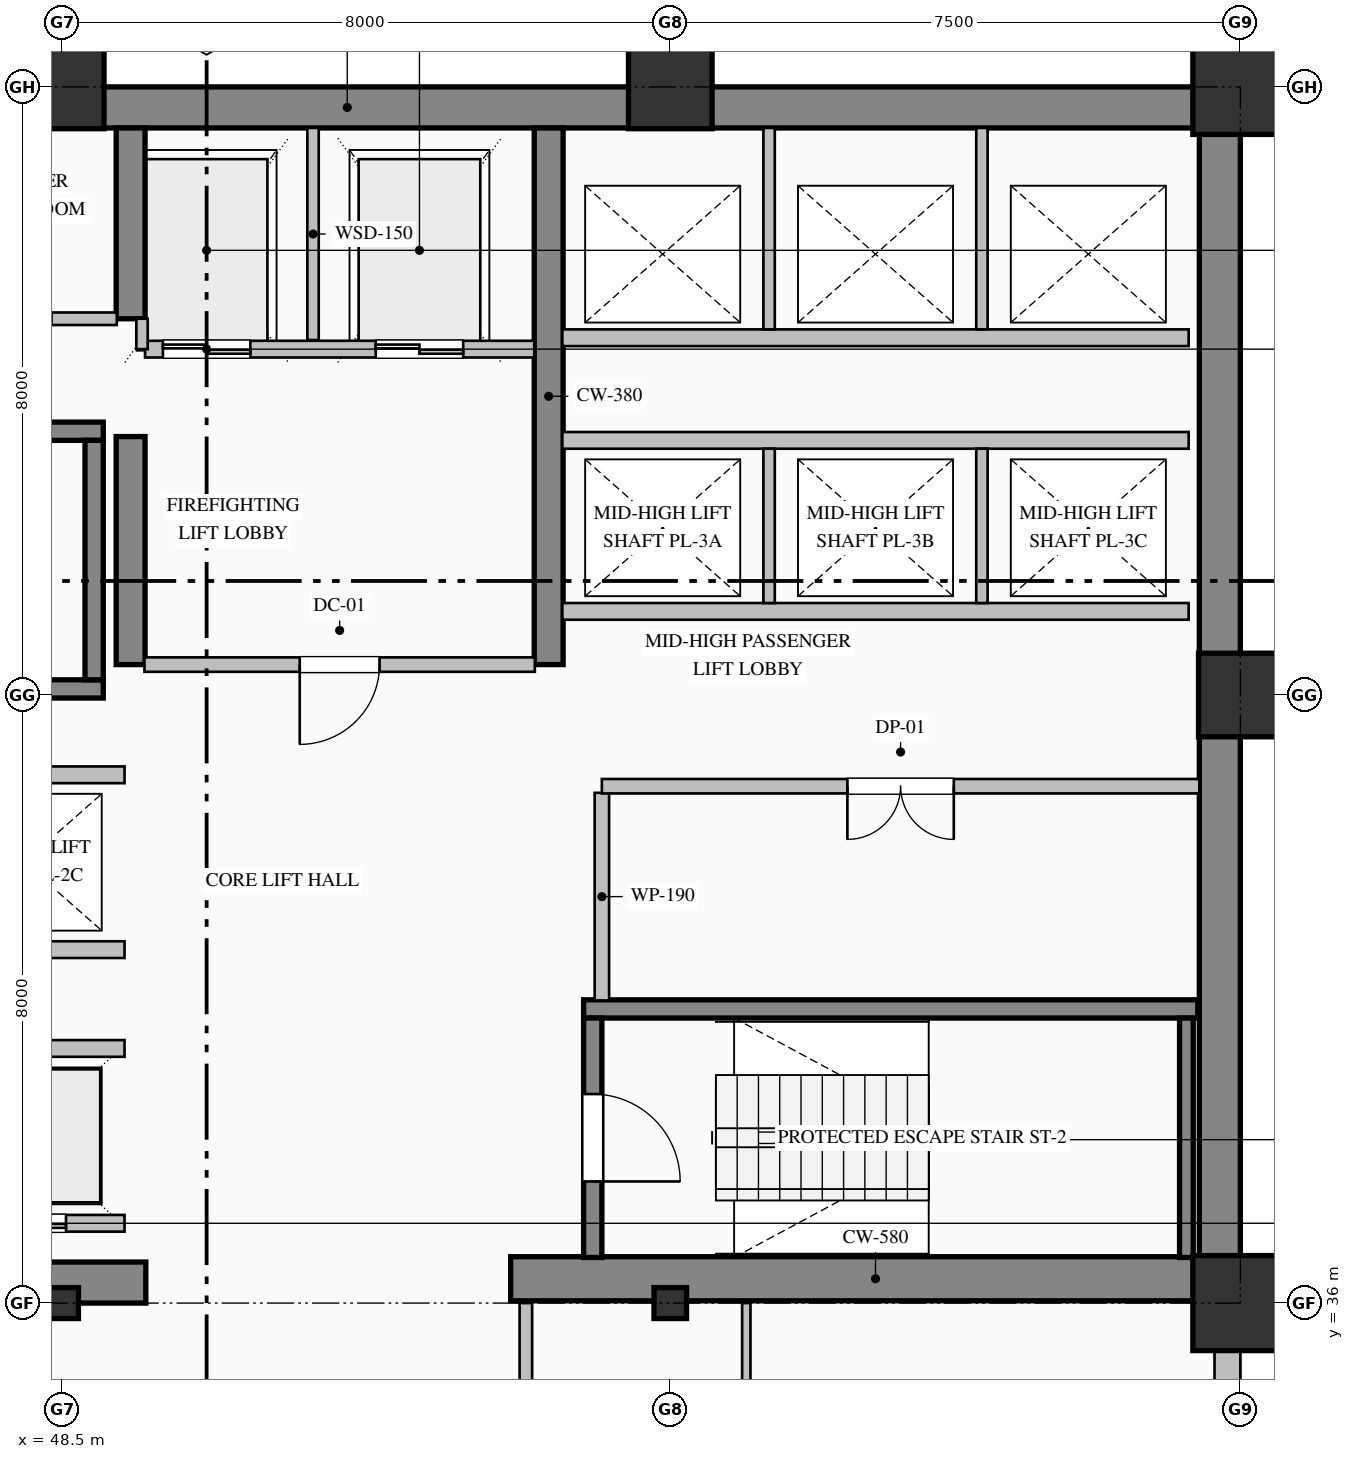
"""IFC4 building model, lengths in metres.
Left out: names, types, materials, properties, quantities, classifications, styles, units other than length and angle.
Written with IfcOpenShell. Run it as: python <this file> out.ifc"""

import sys

from ifc_helpers import new_model, si_unit, direction, frame, frame_2d, origin, origin_2d, place, context, subcontext, project, spatial, rectangle, hollow_rectangle, i_section, extrude, element, fill, save


model = new_model("IFC4")
c1 = context("Model", 3, precision=1e-05, world=origin(), true_north=direction((0.0, 1.0)))
c2 = subcontext(c1, "Body", "Model", "MODEL_VIEW")
j1 = project(units=[si_unit("LENGTHUNIT", "METRE"), si_unit("PLANEANGLEUNIT", "RADIAN")], contexts=[c1])
p1 = place(None, origin())
s1 = spatial("IfcSite", under=j1, at=p1, CompositionType="ELEMENT")
p2 = place(p1, origin())
s2 = spatial("IfcBuilding", under=s1, at=p2, CompositionType="ELEMENT")
p3 = place(p2, frame((0.0, 0.0, 72.2)))
s3 = spatial("IfcBuildingStorey", under=s2, at=p3, CompositionType="ELEMENT", Elevation=72.2)
p4 = place(p3, frame((40.5, 51.73, 0.0), z_axis=(0.0, 0.0, 1.0), x_axis=(1.0, 0.0, 0.0)))
e1 = element("IfcWall", 1, at=p4, inside=s3, PredefinedType="SHEAR", context=c2, shape_type="SweptSolid", body=[
    extrude(rectangle(XDim=23.5, YDim=0.54, at=frame_2d((11.75, 0.0))), origin(), (0.0, 0.0, 1.0), 3.75),
])
p5 = place(p3, frame((63.73, 36.32, 0.0), z_axis=(0.0, 0.0, 1.0), x_axis=(0.0, 1.0, 0.0)))
e2 = element("IfcWall", 2, at=p5, inside=s3, PredefinedType="SHEAR", context=c2, shape_type="SweptSolid", body=[
    extrude(rectangle(XDim=15.14, YDim=0.54, at=frame_2d((7.57, 0.0))), origin(), (0.0, 0.0, 1.0), 3.75),
])
p6 = place(p3, frame((48.2, 36.27, 0.0), z_axis=(0.0, 0.0, 1.0), x_axis=(1.0, 0.0, 0.0)))
e3 = element("IfcWall", 3, at=p6, inside=s3, PredefinedType="SHEAR", context=c2, shape_type="SweptSolid", body=[
    extrude(rectangle(XDim=1.4, YDim=0.54, at=frame_2d((0.7, 0.0))), origin(), (0.0, 0.0, 1.0), 3.75),
])
p7 = place(p3, frame((54.4, 36.32, 0.0), z_axis=(0.0, 0.0, 1.0), x_axis=(1.0, 0.0, 0.0)))
e4 = element("IfcWall", 4, at=p7, inside=s3, PredefinedType="SHEAR", context=c2, shape_type="SweptSolid", body=[
    extrude(rectangle(XDim=9.6, YDim=0.58, at=frame_2d((4.8, 0.0))), origin(), (0.0, 0.0, 1.0), 4.0),
])
p8 = place(p3, frame((49.4, 44.4, 0.0), z_axis=(0.0, 0.0, 1.0), x_axis=(0.0, 1.0, 0.0)))
e5 = element("IfcWall", 5, at=p8, inside=s3, PredefinedType="SHEAR", context=c2, shape_type="SweptSolid", body=[
    extrude(rectangle(XDim=3.0, YDim=0.38, at=frame_2d((1.5, 0.0))), origin(), (0.0, 0.0, 1.0), 3.75),
])
p9 = place(p3, frame((49.4, 48.95, 0.0), z_axis=(0.0, 0.0, 1.0), x_axis=(0.0, 1.0, 0.0)))
e6 = element("IfcWall", 6, at=p9, inside=s3, PredefinedType="SHEAR", context=c2, shape_type="SweptSolid", body=[
    extrude(rectangle(XDim=2.51, YDim=0.38, at=frame_2d((1.255, 0.0))), origin(), (0.0, 0.0, 1.0), 3.75),
])
p10 = place(p3, frame((54.9, 44.4, 0.0), z_axis=(0.0, 0.0, 1.0), x_axis=(0.0, 1.0, 0.0)))
e7 = element("IfcWall", 7, at=p10, inside=s3, PredefinedType="SHEAR", context=c2, shape_type="SweptSolid", body=[
    extrude(rectangle(XDim=7.06, YDim=0.38, at=frame_2d((3.53, 0.0))), origin(), (0.0, 0.0, 1.0), 3.75),
])
p11 = place(p3, frame((48.5, 36.0, 0.0), z_axis=(0.0, 0.0, 1.0), x_axis=(1.0, 0.0, 0.0)))
e8 = element("IfcColumn", 8, at=p11, inside=s3, PredefinedType="COLUMN", context=c2, shape_type="SweptSolid", body=[
    extrude(i_section(OverallWidth=0.407, OverallDepth=0.428, WebThickness=0.02, FlangeThickness=0.035, FilletRadius=0.022, at=origin_2d()), origin(), (0.0, 0.0, 1.0), 4.0),
])
p12 = place(p3, frame((48.5, 52.0, 0.0), z_axis=(0.0, 0.0, 1.0), x_axis=(1.0, 0.0, 0.0)))
e9 = element("IfcColumn", 9, at=p12, inside=s3, PredefinedType="COLUMN", context=c2, shape_type="SweptSolid", body=[
    extrude(hollow_rectangle(XDim=1.1, YDim=1.1, WallThickness=0.04, at=origin_2d()), origin(), (0.0, 0.0, 1.0), 4.0),
])
p13 = place(p3, frame((56.5, 36.0, 0.0), z_axis=(0.0, 0.0, 1.0), x_axis=(1.0, 0.0, 0.0)))
e10 = element("IfcColumn", 10, at=p13, inside=s3, PredefinedType="COLUMN", context=c2, shape_type="SweptSolid", body=[
    extrude(i_section(OverallWidth=0.407, OverallDepth=0.428, WebThickness=0.02, FlangeThickness=0.035, FilletRadius=0.022, at=origin_2d()), origin(), (0.0, 0.0, 1.0), 4.0),
])
p14 = place(p3, frame((56.5, 52.0, 0.0), z_axis=(0.0, 0.0, 1.0), x_axis=(1.0, 0.0, 0.0)))
e11 = element("IfcColumn", 11, at=p14, inside=s3, PredefinedType="COLUMN", context=c2, shape_type="SweptSolid", body=[
    extrude(hollow_rectangle(XDim=1.1, YDim=1.1, WallThickness=0.04, at=origin_2d()), origin(), (0.0, 0.0, 1.0), 4.0),
])
p15 = place(p3, frame((64.0, 36.0, 0.0), z_axis=(0.0, 0.0, 1.0), x_axis=(1.0, 0.0, 0.0)))
e12 = element("IfcColumn", 12, at=p15, inside=s3, PredefinedType="COLUMN", context=c2, shape_type="SweptSolid", body=[
    extrude(hollow_rectangle(XDim=1.25, YDim=1.25, WallThickness=0.045, at=origin_2d()), origin(), (0.0, 0.0, 1.0), 4.0),
])
p16 = place(p3, frame((64.0, 44.0, 0.0), z_axis=(0.0, 0.0, 1.0), x_axis=(1.0, 0.0, 0.0)))
e13 = element("IfcColumn", 13, at=p16, inside=s3, PredefinedType="COLUMN", context=c2, shape_type="SweptSolid", body=[
    extrude(hollow_rectangle(XDim=1.1, YDim=1.1, WallThickness=0.04, at=origin_2d()), origin(), (0.0, 0.0, 1.0), 4.0),
])
p17 = place(p3, frame((64.0, 52.0, 0.0), z_axis=(0.0, 0.0, 1.0), x_axis=(1.0, 0.0, 0.0)))
e14 = element("IfcColumn", 14, at=p17, inside=s3, PredefinedType="COLUMN", context=c2, shape_type="SweptSolid", body=[
    extrude(hollow_rectangle(XDim=1.25, YDim=1.25, WallThickness=0.045, at=origin_2d()), origin(), (0.0, 0.0, 1.0), 4.0),
])
p18 = place(p3, frame((63.83, 36.05, 0.0), z_axis=(0.0, 0.0, 1.0), x_axis=(0.0, -1.0, 0.0)))
e15 = element("IfcWall", 15, at=p18, inside=s3, PredefinedType="SOLIDWALL", context=c2, shape_type="SweptSolid", body=[
    extrude(rectangle(XDim=28.05, YDim=0.34, at=frame_2d((14.025, 0.0))), origin(), (0.0, 0.0, 1.0), 3.25),
])
p19 = place(p18, frame((2.4, 0.0, 0.8)))
e16 = element("IfcOpeningElement", 16, at=p19, cuts=e15, PredefinedType="OPENING", context=c2, shape_type="SweptSolid", body=[
    extrude(rectangle(XDim=2.4, YDim=2.15, at=frame_2d((1.2, 1.075))), frame((0.0, 0.18, 0.0), z_axis=(0.0, -1.0, 0.0), x_axis=(1.0, 0.0, 0.0)), (0.0, 0.0, 1.0), 0.36),
])
p20 = place(p18, frame((9.75, 0.0, 0.85)))
e17 = element("IfcOpeningElement", 17, at=p20, cuts=e15, PredefinedType="OPENING", context=c2, shape_type="SweptSolid", body=[
    extrude(rectangle(XDim=2.1, YDim=2.05, at=frame_2d((1.05, 1.025))), frame((0.0, 0.18, 0.0), z_axis=(0.0, -1.0, 0.0), x_axis=(1.0, 0.0, 0.0)), (0.0, 0.0, 1.0), 0.36),
])
p21 = place(p18, frame((13.2, 0.0, 0.8)))
e18 = element("IfcOpeningElement", 18, at=p21, cuts=e15, PredefinedType="OPENING", context=c2, shape_type="SweptSolid", body=[
    extrude(rectangle(XDim=2.4, YDim=2.15, at=frame_2d((1.2, 1.075))), frame((0.0, 0.18, 0.0), z_axis=(0.0, -1.0, 0.0), x_axis=(1.0, 0.0, 0.0)), (0.0, 0.0, 1.0), 0.36),
])
for number, where, z_axis, x_axis in (
    (19, (40.96, 47.47, 0.0), (0.0, 0.0, 1.0), (1.0, 0.0, 0.0)),
    (20, (49.04, 44.08, 0.0), (0.0, 0.0, 1.0), (-1.0, 0.0, 0.0)),
):
    element("IfcWall", number, at=place(p3, frame(where, z_axis=z_axis, x_axis=x_axis)), inside=s3, PredefinedType="SOLIDWALL", context=c2, shape_type="SweptSolid", body=[
        extrude(rectangle(XDim=8.08, YDim=0.24, at=frame_2d((4.04, 0.0))), origin(), (0.0, 0.0, 1.0), 4.0),
    ])
p22 = place(p3, frame((48.92, 44.2, 0.0), z_axis=(0.0, 0.0, 1.0), x_axis=(0.0, 1.0, 0.0)))
e21 = element("IfcWall", 21, at=p22, inside=s3, PredefinedType="SOLIDWALL", context=c2, shape_type="SweptSolid", body=[
    extrude(rectangle(XDim=3.15, YDim=0.24, at=frame_2d((1.575, 0.0))), origin(), (0.0, 0.0, 1.0), 4.0),
])
p23 = place(p3, frame((55.36, 39.87, 0.0), z_axis=(0.0, 0.0, 1.0), x_axis=(1.0, 0.0, 0.0)))
e22 = element("IfcWall", 22, at=p23, inside=s3, PredefinedType="SOLIDWALL", context=c2, shape_type="SweptSolid", body=[
    extrude(rectangle(XDim=8.08, YDim=0.24, at=frame_2d((4.04, 0.0))), origin(), (0.0, 0.0, 1.0), 4.0),
])
p24 = place(p3, frame((55.48, 39.75, 0.0), z_axis=(0.0, 0.0, 1.0), x_axis=(0.0, -1.0, 0.0)))
e23 = element("IfcWall", 23, at=p24, inside=s3, PredefinedType="SOLIDWALL", context=c2, shape_type="SweptSolid", body=[
    extrude(rectangle(XDim=3.15, YDim=0.24, at=frame_2d((1.575, 0.0))), origin(), (0.0, 0.0, 1.0), 4.0),
])
p25 = place(p24, frame((1.0, 0.0, 0.0)))
e24 = element("IfcOpeningElement", 24, at=p25, cuts=e23, PredefinedType="OPENING", context=c2, shape_type="SweptSolid", body=[
    extrude(rectangle(XDim=1.15, YDim=2.2, at=frame_2d((0.575, 1.1))), frame((0.0, 0.13, 0.0), z_axis=(0.0, -1.0, 0.0), x_axis=(1.0, 0.0, 0.0)), (0.0, 0.0, 1.0), 0.26),
])
p26 = place(p3, frame((63.29, 36.6, 0.0), z_axis=(0.0, 0.0, 1.0), x_axis=(0.0, 1.0, 0.0)))
e25 = element("IfcWall", 25, at=p26, inside=s3, PredefinedType="SOLIDWALL", context=c2, shape_type="SweptSolid", body=[
    extrude(rectangle(XDim=3.15, YDim=0.18, at=frame_2d((1.575, 0.0))), origin(), (0.0, 0.0, 1.0), 4.0),
])
p27 = place(p3, frame((54.71, 48.55, 0.0), z_axis=(0.0, 0.0, 1.0), x_axis=(-1.0, 0.0, 0.0)))
e26 = element("IfcWall", 26, at=p27, inside=s3, PredefinedType="PARTITIONING", context=c2, shape_type="SweptSolid", body=[
    extrude(rectangle(XDim=5.12, YDim=0.22, at=frame_2d((2.56, 0.0))), origin(), (0.0, 0.0, 1.0), 3.75),
])
p28 = place(p27, frame((3.735, 0.0, 0.0)))
e27 = element("IfcOpeningElement", 27, at=p28, cuts=e26, PredefinedType="OPENING", context=c2, shape_type="SweptSolid", body=[
    extrude(rectangle(XDim=1.15, YDim=2.2, at=frame_2d((0.575, 1.1))), frame((0.0, 0.12, 0.0), z_axis=(0.0, -1.0, 0.0), x_axis=(1.0, 0.0, 0.0)), (0.0, 0.0, 1.0), 0.24),
])
p29 = place(p27, frame((0.935, 0.0, 0.0)))
e28 = element("IfcOpeningElement", 28, at=p29, cuts=e26, PredefinedType="OPENING", context=c2, shape_type="SweptSolid", body=[
    extrude(rectangle(XDim=1.15, YDim=2.2, at=frame_2d((0.575, 1.1))), frame((0.0, 0.12, 0.0), z_axis=(0.0, -1.0, 0.0), x_axis=(1.0, 0.0, 0.0)), (0.0, 0.0, 1.0), 0.24),
])
p30 = place(p3, frame((51.8, 48.67, 0.0), z_axis=(0.0, 0.0, 1.0), x_axis=(0.0, 1.0, 0.0)))
e29 = element("IfcWall", 29, at=p30, inside=s3, PredefinedType="PARTITIONING", context=c2, shape_type="SweptSolid", body=[
    extrude(rectangle(XDim=2.79, YDim=0.15, at=frame_2d((1.395, 0.0))), origin(), (0.0, 0.0, 1.0), 3.75),
])
p31 = place(p3, frame((49.55, 48.55, 0.0), z_axis=(0.0, 0.0, 1.0), x_axis=(0.0, 1.0, 0.0)))
e30 = element("IfcWall", 30, at=p31, inside=s3, PredefinedType="PARTITIONING", context=c2, shape_type="SweptSolid", body=[
    extrude(rectangle(XDim=0.4, YDim=0.15, at=frame_2d((0.2, 0.0))), origin(), (0.0, 0.0, 1.0), 3.75),
])
p32 = place(p3, frame((49.32, 37.05, 0.0), z_axis=(0.0, 0.0, 1.0), x_axis=(-1.0, 0.0, 0.0)))
e31 = element("IfcWall", 31, at=p32, inside=s3, PredefinedType="PARTITIONING", context=c2, shape_type="SweptSolid", body=[
    extrude(rectangle(XDim=8.24, YDim=0.22, at=frame_2d((4.12, 0.0))), origin(), (0.0, 0.0, 1.0), 3.75),
])
p33 = place(p32, frame((6.37, 0.0, 0.0)))
e32 = element("IfcOpeningElement", 32, at=p33, cuts=e31, PredefinedType="OPENING", context=c2, shape_type="SweptSolid", body=[
    extrude(rectangle(XDim=1.1, YDim=2.2, at=frame_2d((0.55, 1.1))), frame((0.0, 0.12, 0.0), z_axis=(0.0, -1.0, 0.0), x_axis=(1.0, 0.0, 0.0)), (0.0, 0.0, 1.0), 0.24),
])
p34 = place(p32, frame((3.57, 0.0, 0.0)))
e33 = element("IfcOpeningElement", 33, at=p34, cuts=e31, PredefinedType="OPENING", context=c2, shape_type="SweptSolid", body=[
    extrude(rectangle(XDim=1.1, YDim=2.2, at=frame_2d((0.55, 1.1))), frame((0.0, 0.12, 0.0), z_axis=(0.0, -1.0, 0.0), x_axis=(1.0, 0.0, 0.0)), (0.0, 0.0, 1.0), 0.24),
])
p35 = place(p32, frame((0.77, 0.0, 0.0)))
e34 = element("IfcOpeningElement", 34, at=p35, cuts=e31, PredefinedType="OPENING", context=c2, shape_type="SweptSolid", body=[
    extrude(rectangle(XDim=1.1, YDim=2.2, at=frame_2d((0.55, 1.1))), frame((0.0, 0.12, 0.0), z_axis=(0.0, -1.0, 0.0), x_axis=(1.0, 0.0, 0.0)), (0.0, 0.0, 1.0), 0.24),
])
for number, where, z_axis, x_axis in (
    (35, (41.08, 39.35, 0.0), (0.0, 0.0, 1.0), (1.0, 0.0, 0.0)),
    (36, (49.32, 40.65, 0.0), (0.0, 0.0, 1.0), (-1.0, 0.0, 0.0)),
    (37, (41.08, 42.95, 0.0), (0.0, 0.0, 1.0), (1.0, 0.0, 0.0)),
    (38, (63.32, 45.1, 0.0), (0.0, 0.0, 1.0), (-1.0, 0.0, 0.0)),
    (39, (55.08, 47.35, 0.0), (0.0, 0.0, 1.0), (1.0, 0.0, 0.0)),
):
    element("IfcWall", number, at=place(p3, frame(where, z_axis=z_axis, x_axis=x_axis)), inside=s3, PredefinedType="PARTITIONING", context=c2, shape_type="SweptSolid", body=[
        extrude(rectangle(XDim=8.24, YDim=0.22, at=frame_2d((4.12, 0.0))), origin(), (0.0, 0.0, 1.0), 3.75),
    ])
for number, where, z_axis, x_axis in (
    (40, (57.8, 45.21, 0.0), (0.0, 0.0, 1.0), (0.0, 1.0, 0.0)),
    (41, (60.6, 45.21, 0.0), (0.0, 0.0, 1.0), (0.0, 1.0, 0.0)),
):
    element("IfcWall", number, at=place(p3, frame(where, z_axis=z_axis, x_axis=x_axis)), inside=s3, PredefinedType="PARTITIONING", context=c2, shape_type="SweptSolid", body=[
        extrude(rectangle(XDim=2.03, YDim=0.15, at=frame_2d((1.015, 0.0))), origin(), (0.0, 0.0, 1.0), 3.75),
    ])
p36 = place(p3, frame((63.32, 48.7, 0.0), z_axis=(0.0, 0.0, 1.0), x_axis=(-1.0, 0.0, 0.0)))
e42 = element("IfcWall", 42, at=p36, inside=s3, PredefinedType="PARTITIONING", context=c2, shape_type="SweptSolid", body=[
    extrude(rectangle(XDim=8.24, YDim=0.22, at=frame_2d((4.12, 0.0))), origin(), (0.0, 0.0, 1.0), 3.75),
])
for number, where, z_axis, x_axis in (
    (43, (57.8, 48.81, 0.0), (0.0, 0.0, 1.0), (0.0, 1.0, 0.0)),
    (44, (60.6, 48.81, 0.0), (0.0, 0.0, 1.0), (0.0, 1.0, 0.0)),
):
    element("IfcWall", number, at=place(p3, frame(where, z_axis=z_axis, x_axis=x_axis)), inside=s3, PredefinedType="PARTITIONING", context=c2, shape_type="SweptSolid", body=[
        extrude(rectangle(XDim=2.65, YDim=0.15, at=frame_2d((1.325, 0.0))), origin(), (0.0, 0.0, 1.0), 3.75),
    ])
p37 = place(p3, frame((46.6, 48.95, 0.0), z_axis=(0.0, 0.0, 1.0), x_axis=(1.0, 0.0, 0.0)))
e45 = element("IfcWall", 45, at=p37, inside=s3, PredefinedType="PARTITIONING", context=c2, shape_type="SweptSolid", body=[
    extrude(rectangle(XDim=2.618, YDim=0.165, at=frame_2d((1.309, 0.0))), origin(), (0.0, 0.0, 1.0), 3.75),
])
p38 = place(p37, frame((0.859, 0.0, 0.0)))
e46 = element("IfcOpeningElement", 46, at=p38, cuts=e45, PredefinedType="OPENING", context=c2, shape_type="SweptSolid", body=[
    extrude(rectangle(XDim=0.9, YDim=2.15, at=frame_2d((0.45, 1.075))), frame((0.0, 0.093, 0.0), z_axis=(0.0, -1.0, 0.0), x_axis=(1.0, 0.0, 0.0)), (0.0, 0.0, 1.0), 0.185),
])
p39 = place(p3, frame((54.718, 44.4, 0.0), z_axis=(0.0, 0.0, 1.0), x_axis=(-1.0, 0.0, 0.0)))
e47 = element("IfcWall", 47, at=p39, inside=s3, PredefinedType="PARTITIONING", context=c2, shape_type="SweptSolid", body=[
    extrude(rectangle(XDim=5.136, YDim=0.19, at=frame_2d((2.568, 0.0))), origin(), (0.0, 0.0, 1.0), 3.75),
])
p40 = place(p39, frame((2.043, 0.0, 0.0)))
e48 = element("IfcOpeningElement", 48, at=p40, cuts=e47, PredefinedType="OPENING", context=c2, shape_type="SweptSolid", body=[
    extrude(rectangle(XDim=1.05, YDim=2.15, at=frame_2d((0.525, 1.075))), frame((0.0, 0.105, 0.0), z_axis=(0.0, -1.0, 0.0), x_axis=(1.0, 0.0, 0.0)), (0.0, 0.0, 1.0), 0.21),
])
p41 = place(p3, frame((55.6, 42.713, 0.0), z_axis=(0.0, 0.0, 1.0), x_axis=(0.0, -1.0, 0.0)))
e49 = element("IfcWall", 49, at=p41, inside=s3, PredefinedType="PARTITIONING", context=c2, shape_type="SweptSolid", body=[
    extrude(rectangle(XDim=2.731, YDim=0.19, at=frame_2d((1.365, 0.0))), origin(), (0.0, 0.0, 1.0), 3.75),
])
p42 = place(p3, frame((63.46, 42.8, 0.0), z_axis=(0.0, 0.0, 1.0), x_axis=(-1.0, 0.0, 0.0)))
e50 = element("IfcWall", 50, at=p42, inside=s3, PredefinedType="PARTITIONING", context=c2, shape_type="SweptSolid", body=[
    extrude(rectangle(XDim=7.86, YDim=0.19, at=frame_2d((3.93, 0.0))), origin(), (0.0, 0.0, 1.0), 3.75),
])
p43 = place(p42, frame((3.23, 0.0, 0.0)))
e51 = element("IfcOpeningElement", 51, at=p43, cuts=e50, PredefinedType="OPENING", context=c2, shape_type="SweptSolid", body=[
    extrude(rectangle(XDim=1.4, YDim=2.25, at=frame_2d((0.7, 1.125))), frame((0.0, 0.105, 0.0), z_axis=(0.0, -1.0, 0.0), x_axis=(1.0, 0.0, 0.0)), (0.0, 0.0, 1.0), 0.21),
])
p44 = place(p3, frame((54.6, 36.0, 0.0), z_axis=(0.0, 0.0, 1.0), x_axis=(0.0, -1.0, 0.0)))
e52 = element("IfcWall", 52, at=p44, inside=s3, PredefinedType="PARTITIONING", context=c2, shape_type="SweptSolid", body=[
    extrude(rectangle(XDim=2.125, YDim=0.165, at=frame_2d((1.063, 0.0))), origin(), (0.0, 0.0, 1.0), 3.75),
])
p45 = place(p3, frame((57.5, 36.0, 0.0), z_axis=(0.0, 0.0, 1.0), x_axis=(0.0, -1.0, 0.0)))
e53 = element("IfcWall", 53, at=p45, inside=s3, PredefinedType="MOVABLE", context=c2, shape_type="SweptSolid", body=[
    extrude(rectangle(XDim=21.226, YDim=0.11, at=frame_2d((10.613, 0.0))), origin(), (0.0, 0.0, 1.0), 3.75),
])
p46 = place(p25, origin())
e54 = element("IfcDoor", 54, at=p46, inside=s3, OperationType="SINGLE_SWING_RIGHT", PredefinedType="DOOR", context=c2, shape_type="SweptSolid", body=[
    extrude(rectangle(XDim=1.15, YDim=2.2, at=frame_2d((0.575, 1.1))), frame((0.0, 0.025, 0.0), z_axis=(0.0, -1.0, 0.0), x_axis=(1.0, 0.0, 0.0)), (0.0, 0.0, 1.0), 0.05),
])
fill(e24, e54)
p47 = place(p28, origin())
e55 = element("IfcDoor", 55, at=p47, inside=s3, OperationType="DOUBLE_DOOR_SLIDING", PredefinedType="DOOR", context=c2, shape_type="SweptSolid", body=[
    extrude(rectangle(XDim=1.15, YDim=2.2, at=frame_2d((0.575, 1.1))), frame((0.0, 0.025, 0.0), z_axis=(0.0, -1.0, 0.0), x_axis=(1.0, 0.0, 0.0)), (0.0, 0.0, 1.0), 0.05),
])
fill(e27, e55)
p48 = place(p29, origin())
e56 = element("IfcDoor", 56, at=p48, inside=s3, OperationType="DOUBLE_DOOR_SLIDING", PredefinedType="DOOR", context=c2, shape_type="SweptSolid", body=[
    extrude(rectangle(XDim=1.15, YDim=2.2, at=frame_2d((0.575, 1.1))), frame((0.0, 0.025, 0.0), z_axis=(0.0, -1.0, 0.0), x_axis=(1.0, 0.0, 0.0)), (0.0, 0.0, 1.0), 0.05),
])
fill(e28, e56)
p49 = place(p35, origin())
e57 = element("IfcDoor", 57, at=p49, inside=s3, OperationType="DOUBLE_DOOR_SLIDING", PredefinedType="DOOR", context=c2, shape_type="SweptSolid", body=[
    extrude(rectangle(XDim=1.1, YDim=2.2, at=frame_2d((0.55, 1.1))), frame((0.0, 0.025, 0.0), z_axis=(0.0, -1.0, 0.0), x_axis=(1.0, 0.0, 0.0)), (0.0, 0.0, 1.0), 0.05),
])
fill(e34, e57)
p50 = place(p40, origin())
e58 = element("IfcDoor", 58, at=p50, inside=s3, OperationType="SINGLE_SWING_RIGHT", PredefinedType="DOOR", context=c2, shape_type="SweptSolid", body=[
    extrude(rectangle(XDim=1.05, YDim=2.15, at=frame_2d((0.525, 1.075))), frame((0.0, 0.025, 0.0), z_axis=(0.0, -1.0, 0.0), x_axis=(1.0, 0.0, 0.0)), (0.0, 0.0, 1.0), 0.05),
])
fill(e48, e58)
p51 = place(p43, origin())
e59 = element("IfcDoor", 59, at=p51, inside=s3, OperationType="DOUBLE_DOOR_SINGLE_SWING", PredefinedType="DOOR", context=c2, shape_type="SweptSolid", body=[
    extrude(rectangle(XDim=1.4, YDim=2.25, at=frame_2d((0.7, 1.125))), frame((0.0, 0.025, 0.0), z_axis=(0.0, -1.0, 0.0), x_axis=(1.0, 0.0, 0.0)), (0.0, 0.0, 1.0), 0.05),
])
fill(e51, e59)
save(model, sys.argv[1])
